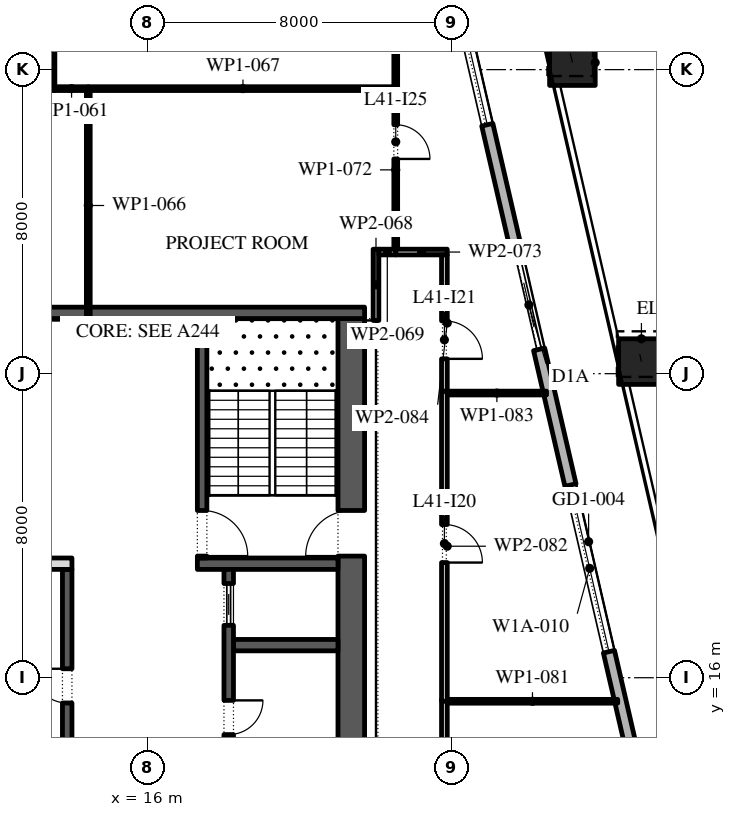
"""IFC4 building model, lengths in metres.
Left out: names, types, materials, properties, quantities, classifications, styles, units other than length and angle.
Written with IfcOpenShell. Run it as: python <this file> out.ifc"""

import sys

from ifc_helpers import new_model, si_unit, direction, frame, frame_2d, origin, origin_2d, place, context, subcontext, project, spatial, rectangle, extrude, element, fill, save


model = new_model("IFC4")
c1 = context("Model", 3, precision=1e-05, world=origin(), true_north=direction((0.0, 1.0)))
c2 = subcontext(c1, "Body", "Model", "MODEL_VIEW")
j1 = project(units=[si_unit("LENGTHUNIT", "METRE"), si_unit("PLANEANGLEUNIT", "RADIAN")], contexts=[c1])
p1 = place(None, origin())
s1 = spatial("IfcSite", under=j1, at=p1, CompositionType="ELEMENT")
p2 = place(p1, origin())
s2 = spatial("IfcBuilding", under=s1, at=p2, CompositionType="ELEMENT")
p3 = place(p2, frame((0.0, 0.0, 188.4)))
s3 = spatial("IfcBuildingStorey", under=s2, at=p3, CompositionType="ELEMENT", Elevation=188.4)
p4 = place(p3, frame((28.984, 24.318, 0.0), z_axis=(-0.010740940982, 0.046737608058, 0.99884945221), x_axis=(-0.974594841169, -0.223975211946, 0.0)))
e1 = element("IfcColumn", 1, at=p4, inside=s3, PredefinedType="COLUMN", context=c2, shape_type="SweptSolid", body=[
    extrude(rectangle(XDim=1.2, YDim=1.2, at=origin_2d()), origin(), (0.0, 0.0, 1.0), 4.205),
])
p5 = place(p3, frame((27.168, 32.185, 0.0), z_axis=(-0.013461020192, 0.058369768591, 0.998204273208), x_axis=(-0.974423835271, -0.224718021653, 0.0)))
e2 = element("IfcColumn", 2, at=p5, inside=s3, PredefinedType="COLUMN", context=c2, shape_type="SweptSolid", body=[
    extrude(rectangle(XDim=1.2, YDim=1.2, at=origin_2d()), origin(), (0.0, 0.0, 1.0), 4.208),
])
p6 = place(p3, frame((33.157, -5.092, 0.0), z_axis=(0.0, 0.0, 1.0), x_axis=(-0.224950279389, 0.974370243697, 0.0)))
e3 = element("IfcWall", 3, at=p6, inside=s3, PredefinedType="STANDARD", context=c2, shape_type="SweptSolid", body=[
    extrude(rectangle(XDim=49.5, YDim=0.3, at=frame_2d((24.75, 0.0))), origin(), (0.0, 0.0, 1.0), 4.0),
])
p7 = place(p6, frame((2.207, 0.0, 0.0)))
e4 = element("IfcOpeningElement", 4, at=p7, cuts=e3, PredefinedType="OPENING", context=c2, shape_type="SweptSolid", body=[
    extrude(rectangle(XDim=2.4, YDim=3.125, at=frame_2d((1.2, 1.562))), frame((0.0, 0.16, 0.0), z_axis=(0.0, -1.0, 0.0), x_axis=(1.0, 0.0, 0.0)), (0.0, 0.0, 1.0), 0.32),
])
p8 = place(p6, frame((8.121, 0.0, 0.45)))
e5 = element("IfcOpeningElement", 5, at=p8, cuts=e3, PredefinedType="OPENING", context=c2, shape_type="SweptSolid", body=[
    extrude(rectangle(XDim=4.5, YDim=2.875, at=frame_2d((2.25, 1.438))), frame((0.0, 0.16, 0.0), z_axis=(0.0, -1.0, 0.0), x_axis=(1.0, 0.0, 0.0)), (0.0, 0.0, 1.0), 0.32),
])
p9 = place(p6, frame((15.236, 0.0, 0.45)))
e6 = element("IfcOpeningElement", 6, at=p9, cuts=e3, PredefinedType="OPENING", context=c2, shape_type="SweptSolid", body=[
    extrude(rectangle(XDim=4.5, YDim=2.875, at=frame_2d((2.25, 1.438))), frame((0.0, 0.16, 0.0), z_axis=(0.0, -1.0, 0.0), x_axis=(1.0, 0.0, 0.0)), (0.0, 0.0, 1.0), 0.32),
])
p10 = place(p6, frame((22.35, 0.0, 0.45)))
e7 = element("IfcOpeningElement", 7, at=p10, cuts=e3, PredefinedType="OPENING", context=c2, shape_type="SweptSolid", body=[
    extrude(rectangle(XDim=4.5, YDim=3.0, at=frame_2d((2.25, 1.5))), frame((0.0, 0.16, 0.0), z_axis=(0.0, -1.0, 0.0), x_axis=(1.0, 0.0, 0.0)), (0.0, 0.0, 1.0), 0.32),
])
p11 = place(p6, frame((30.514, 0.0, 0.0)))
e8 = element("IfcOpeningElement", 8, at=p11, cuts=e3, PredefinedType="OPENING", context=c2, shape_type="SweptSolid", body=[
    extrude(rectangle(XDim=2.4, YDim=3.45, at=frame_2d((1.2, 1.725))), frame((0.0, 0.16, 0.0), z_axis=(0.0, -1.0, 0.0), x_axis=(1.0, 0.0, 0.0)), (0.0, 0.0, 1.0), 0.32),
])
p12 = place(p6, frame((36.579, 0.0, 0.45)))
e9 = element("IfcOpeningElement", 9, at=p12, cuts=e3, PredefinedType="OPENING", context=c2, shape_type="SweptSolid", body=[
    extrude(rectangle(XDim=4.5, YDim=3.05, at=frame_2d((2.25, 1.525))), frame((0.0, 0.16, 0.0), z_axis=(0.0, -1.0, 0.0), x_axis=(1.0, 0.0, 0.0)), (0.0, 0.0, 1.0), 0.32),
])
p13 = place(p6, frame((43.693, 0.0, 0.45)))
e10 = element("IfcOpeningElement", 10, at=p13, cuts=e3, PredefinedType="OPENING", context=c2, shape_type="SweptSolid", body=[
    extrude(rectangle(XDim=4.5, YDim=3.05, at=frame_2d((2.25, 1.525))), frame((0.0, 0.16, 0.0), z_axis=(0.0, -1.0, 0.0), x_axis=(1.0, 0.0, 0.0)), (0.0, 0.0, 1.0), 0.32),
])
p14 = place(p3, frame((21.35, -2.45, 0.0), z_axis=(0.0, 0.0, 1.0), x_axis=(0.0, 1.0, 0.0)))
e11 = element("IfcWall", 11, at=p14, inside=s3, PredefinedType="SHEAR", context=c2, shape_type="SweptSolid", body=[
    extrude(rectangle(XDim=27.9, YDim=0.7, at=frame_2d((13.95, 0.0))), origin(), (0.0, 0.0, 1.0), 4.0),
])
p15 = place(p14, frame((5.05, 0.0, 0.0)))
e12 = element("IfcOpeningElement", 12, at=p15, cuts=e11, PredefinedType="OPENING", context=c2, shape_type="SweptSolid", body=[
    extrude(rectangle(XDim=1.2, YDim=2.1, at=frame_2d((0.6, 1.05))), frame((0.0, 0.36, 0.0), z_axis=(0.0, -1.0, 0.0), x_axis=(1.0, 0.0, 0.0)), (0.0, 0.0, 1.0), 0.72),
])
p16 = place(p14, frame((21.65, 0.0, 0.0)))
e13 = element("IfcOpeningElement", 13, at=p16, cuts=e11, PredefinedType="OPENING", context=c2, shape_type="SweptSolid", body=[
    extrude(rectangle(XDim=1.2, YDim=2.1, at=frame_2d((0.6, 1.05))), frame((0.0, 0.36, 0.0), z_axis=(0.0, -1.0, 0.0), x_axis=(1.0, 0.0, 0.0)), (0.0, 0.0, 1.0), 0.72),
])
p17 = place(p3, frame((10.3, 25.6, 0.0), z_axis=(0.0, 0.0, 1.0), x_axis=(1.0, 0.0, 0.0)))
e14 = element("IfcWall", 14, at=p17, inside=s3, PredefinedType="SHEAR", context=c2, shape_type="SweptSolid", body=[
    extrude(rectangle(XDim=11.4, YDim=0.3, at=frame_2d((5.7, 0.0))), origin(), (0.0, 0.0, 1.0), 4.0),
])
p18 = place(p3, frame((17.3, 19.0, 0.0), z_axis=(0.0, 0.0, 1.0), x_axis=(1.0, 0.0, 0.0)))
e15 = element("IfcWall", 15, at=p18, inside=s3, PredefinedType="SHEAR", context=c2, shape_type="SweptSolid", body=[
    extrude(rectangle(XDim=3.7, YDim=0.3, at=frame_2d((1.85, 0.0))), origin(), (0.0, 0.0, 1.0), 4.0),
])
p19 = place(p3, frame((17.425, 19.15, 0.0), z_axis=(0.0, 0.0, 1.0), x_axis=(0.0, 1.0, 0.0)))
e16 = element("IfcWall", 16, at=p19, inside=s3, PredefinedType="SHEAR", context=c2, shape_type="SweptSolid", body=[
    extrude(rectangle(XDim=6.3, YDim=0.25, at=frame_2d((3.15, 0.0))), origin(), (0.0, 0.0, 1.0), 4.0),
])
p20 = place(p19, frame((0.05, 0.0, 0.0)))
e17 = element("IfcOpeningElement", 17, at=p20, cuts=e16, PredefinedType="OPENING", context=c2, shape_type="SweptSolid", body=[
    extrude(rectangle(XDim=1.2, YDim=2.1, at=frame_2d((0.6, 1.05))), frame((0.0, 0.135, 0.0), z_axis=(0.0, -1.0, 0.0), x_axis=(1.0, 0.0, 0.0)), (0.0, 0.0, 1.0), 0.27),
])
p21 = place(p3, frame((18.25, 16.857, 0.0), z_axis=(0.0, 0.0, 1.0), x_axis=(1.0, 0.0, 0.0)))
e18 = element("IfcWall", 18, at=p21, inside=s3, PredefinedType="SHEAR", context=c2, shape_type="SweptSolid", body=[
    extrude(rectangle(XDim=2.75, YDim=0.3, at=frame_2d((1.375, 0.0))), origin(), (0.0, 0.0, 1.0), 4.0),
])
p22 = place(p3, frame((18.125, 4.15, 0.0), z_axis=(0.0, 0.0, 1.0), x_axis=(0.0, 1.0, 0.0)))
e19 = element("IfcWall", 19, at=p22, inside=s3, PredefinedType="SHEAR", context=c2, shape_type="SweptSolid", body=[
    extrude(rectangle(XDim=14.7, YDim=0.25, at=frame_2d((7.35, 0.0))), origin(), (0.0, 0.0, 1.0), 4.0),
])
p23 = place(p22, frame((3.446, 0.0, 0.0)))
e20 = element("IfcOpeningElement", 20, at=p23, cuts=e19, PredefinedType="OPENING", context=c2, shape_type="SweptSolid", body=[
    extrude(rectangle(XDim=0.9, YDim=2.1, at=frame_2d((0.45, 1.05))), frame((0.0, 0.135, 0.0), z_axis=(0.0, -1.0, 0.0), x_axis=(1.0, 0.0, 0.0)), (0.0, 0.0, 1.0), 0.27),
])
p24 = place(p22, frame((6.9, 0.0, 0.0)))
e21 = element("IfcOpeningElement", 21, at=p24, cuts=e19, PredefinedType="OPENING", context=c2, shape_type="SweptSolid", body=[
    extrude(rectangle(XDim=0.9, YDim=2.1, at=frame_2d((0.45, 1.05))), frame((0.0, 0.135, 0.0), z_axis=(0.0, -1.0, 0.0), x_axis=(1.0, 0.0, 0.0)), (0.0, 0.0, 1.0), 0.27),
])
p25 = place(p22, frame((10.354, 0.0, 0.0)))
e22 = element("IfcOpeningElement", 22, at=p25, cuts=e19, PredefinedType="OPENING", context=c2, shape_type="SweptSolid", body=[
    extrude(rectangle(XDim=0.9, YDim=2.1, at=frame_2d((0.45, 1.05))), frame((0.0, 0.135, 0.0), z_axis=(0.0, -1.0, 0.0), x_axis=(1.0, 0.0, 0.0)), (0.0, 0.0, 1.0), 0.27),
])
p26 = place(p22, frame((0.371, 0.0, 0.0)))
e23 = element("IfcOpeningElement", 23, at=p26, cuts=e19, PredefinedType="OPENING", context=c2, shape_type="SweptSolid", body=[
    extrude(rectangle(XDim=1.1, YDim=2.1, at=frame_2d((0.55, 1.05))), frame((0.0, 0.135, 0.0), z_axis=(0.0, -1.0, 0.0), x_axis=(1.0, 0.0, 0.0)), (0.0, 0.0, 1.0), 0.27),
])
p27 = place(p22, frame((13.229, 0.0, 0.0)))
e24 = element("IfcOpeningElement", 24, at=p27, cuts=e19, PredefinedType="OPENING", context=c2, shape_type="SweptSolid", body=[
    extrude(rectangle(XDim=1.1, YDim=2.1, at=frame_2d((0.55, 1.05))), frame((0.0, 0.135, 0.0), z_axis=(0.0, -1.0, 0.0), x_axis=(1.0, 0.0, 0.0)), (0.0, 0.0, 1.0), 0.27),
])
p28 = place(p3, frame((13.875, -2.45, 0.0), z_axis=(0.0, 0.0, 1.0), x_axis=(0.0, 1.0, 0.0)))
e25 = element("IfcWall", 25, at=p28, inside=s3, PredefinedType="SHEAR", context=c2, shape_type="SweptSolid", body=[
    extrude(rectangle(XDim=21.3, YDim=0.25, at=frame_2d((10.65, 0.0))), origin(), (0.0, 0.0, 1.0), 4.0),
])
p29 = place(p28, frame((17.786, 0.0, 0.0)))
e26 = element("IfcOpeningElement", 26, at=p29, cuts=e25, PredefinedType="OPENING", context=c2, shape_type="SweptSolid", body=[
    extrude(rectangle(XDim=0.9, YDim=2.1, at=frame_2d((0.45, 1.05))), frame((0.0, 0.135, 0.0), z_axis=(0.0, -1.0, 0.0), x_axis=(1.0, 0.0, 0.0)), (0.0, 0.0, 1.0), 0.27),
])
p30 = place(p28, frame((6.971, 0.0, 0.0)))
e27 = element("IfcOpeningElement", 27, at=p30, cuts=e25, PredefinedType="OPENING", context=c2, shape_type="SweptSolid", body=[
    extrude(rectangle(XDim=1.1, YDim=2.1, at=frame_2d((0.55, 1.05))), frame((0.0, 0.135, 0.0), z_axis=(0.0, -1.0, 0.0), x_axis=(1.0, 0.0, 0.0)), (0.0, 0.0, 1.0), 0.27),
])
p31 = place(p28, frame((9.114, 0.0, 0.0)))
e28 = element("IfcOpeningElement", 28, at=p31, cuts=e25, PredefinedType="OPENING", context=c2, shape_type="SweptSolid", body=[
    extrude(rectangle(XDim=1.1, YDim=2.1, at=frame_2d((0.55, 1.05))), frame((0.0, 0.135, 0.0), z_axis=(0.0, -1.0, 0.0), x_axis=(1.0, 0.0, 0.0)), (0.0, 0.0, 1.0), 0.27),
])
p32 = place(p28, frame((11.257, 0.0, 0.0)))
e29 = element("IfcOpeningElement", 29, at=p32, cuts=e25, PredefinedType="OPENING", context=c2, shape_type="SweptSolid", body=[
    extrude(rectangle(XDim=1.1, YDim=2.1, at=frame_2d((0.55, 1.05))), frame((0.0, 0.135, 0.0), z_axis=(0.0, -1.0, 0.0), x_axis=(1.0, 0.0, 0.0)), (0.0, 0.0, 1.0), 0.27),
])
p33 = place(p28, frame((13.4, 0.0, 0.0)))
e30 = element("IfcOpeningElement", 30, at=p33, cuts=e25, PredefinedType="OPENING", context=c2, shape_type="SweptSolid", body=[
    extrude(rectangle(XDim=1.1, YDim=2.1, at=frame_2d((0.55, 1.05))), frame((0.0, 0.135, 0.0), z_axis=(0.0, -1.0, 0.0), x_axis=(1.0, 0.0, 0.0)), (0.0, 0.0, 1.0), 0.27),
])
p34 = place(p3, frame((11.0, 19.0, 0.0), z_axis=(0.0, 0.0, 1.0), x_axis=(1.0, 0.0, 0.0)))
e31 = element("IfcWall", 31, at=p34, inside=s3, PredefinedType="PARTITIONING", context=c2, shape_type="SweptSolid", body=[
    extrude(rectangle(XDim=3.0, YDim=0.3, at=frame_2d((1.5, 0.0))), origin(), (0.0, 0.0, 1.0), 4.0),
])
p35 = place(p3, frame((9.78, 31.5, 0.0), z_axis=(0.0, 0.0, 1.0), x_axis=(1.0, 0.0, 0.0)))
e32 = element("IfcWall", 32, at=p35, inside=s3, PredefinedType="PARTITIONING", context=c2, shape_type="SweptSolid", body=[
    extrude(rectangle(XDim=3.77, YDim=0.1, at=frame_2d((1.885, 0.0))), origin(), (0.0, 0.0, 1.0), 4.0),
])
p36 = place(p3, frame((13.55, 31.5, 0.0), z_axis=(0.0, 0.0, 1.0), x_axis=(1.0, 0.0, 0.0)))
e33 = element("IfcWall", 33, at=p36, inside=s3, PredefinedType="PARTITIONING", context=c2, shape_type="SweptSolid", body=[
    extrude(rectangle(XDim=0.88, YDim=0.1, at=frame_2d((0.44, 0.0))), origin(), (0.0, 0.0, 1.0), 4.0),
])
p37 = place(p3, frame((13.5, 39.95, 0.0), z_axis=(0.0, 0.0, 1.0), x_axis=(0.0, -1.0, 0.0)))
e34 = element("IfcWall", 34, at=p37, inside=s3, PredefinedType="PARTITIONING", context=c2, shape_type="SweptSolid", body=[
    extrude(rectangle(XDim=8.4, YDim=0.1, at=frame_2d((4.2, 0.0))), origin(), (0.0, 0.0, 1.0), 4.0),
])
p38 = place(p3, frame((14.43, 31.45, 0.0), z_axis=(0.0, 0.0, 1.0), x_axis=(0.0, -1.0, 0.0)))
e35 = element("IfcWall", 35, at=p38, inside=s3, PredefinedType="PARTITIONING", context=c2, shape_type="SweptSolid", body=[
    extrude(rectangle(XDim=6.05, YDim=0.1, at=frame_2d((3.025, 0.0))), origin(), (0.0, 0.0, 1.0), 4.0),
])
p39 = place(p3, frame((14.43, 31.5, 0.0), z_axis=(0.0, 0.0, 1.0), x_axis=(1.0, 0.0, 0.0)))
e36 = element("IfcWall", 36, at=p39, inside=s3, PredefinedType="PARTITIONING", context=c2, shape_type="SweptSolid", body=[
    extrude(rectangle(XDim=8.14, YDim=0.1, at=frame_2d((4.07, 0.0))), origin(), (0.0, 0.0, 1.0), 4.0),
])
p40 = place(p3, frame((22.0, 25.4, 0.0), z_axis=(0.0, 0.0, 1.0), x_axis=(0.0, 1.0, 0.0)))
e37 = element("IfcWall", 37, at=p40, inside=s3, PredefinedType="PARTITIONING", context=c2, shape_type="SweptSolid", body=[
    extrude(rectangle(XDim=1.875, YDim=0.15, at=frame_2d((0.938, 0.0))), origin(), (0.0, 0.0, 1.0), 4.0),
])
p41 = place(p3, frame((22.075, 27.2, 0.0), z_axis=(0.0, 0.0, 1.0), x_axis=(1.0, 0.0, 0.0)))
e38 = element("IfcWall", 38, at=p41, inside=s3, PredefinedType="PARTITIONING", context=c2, shape_type="SweptSolid", body=[
    extrude(rectangle(XDim=0.445, YDim=0.15, at=frame_2d((0.223, 0.0))), origin(), (0.0, 0.0, 1.0), 4.0),
])
p42 = place(p3, frame((22.52, 27.275, 0.0), z_axis=(0.0, 0.0, 1.0), x_axis=(0.0, 1.0, 0.0)))
e39 = element("IfcWall", 39, at=p42, inside=s3, PredefinedType="PARTITIONING", context=c2, shape_type="SweptSolid", body=[
    extrude(rectangle(XDim=4.175, YDim=0.1, at=frame_2d((2.087, 0.0))), origin(), (0.0, 0.0, 1.0), 4.0),
])
p43 = place(p42, frame((2.375, 0.0, 0.0)))
e40 = element("IfcOpeningElement", 40, at=p43, cuts=e39, PredefinedType="OPENING", context=c2, shape_type="SweptSolid", body=[
    extrude(rectangle(XDim=0.9, YDim=2.1, at=frame_2d((0.45, 1.05))), frame((0.0, 0.06, 0.0), z_axis=(0.0, -1.0, 0.0), x_axis=(1.0, 0.0, 0.0)), (0.0, 0.0, 1.0), 0.12),
])
p44 = place(p3, frame((22.52, 27.2, 0.0), z_axis=(0.0, 0.0, 1.0), x_axis=(1.0, 0.0, 0.0)))
e41 = element("IfcWall", 41, at=p44, inside=s3, PredefinedType="PARTITIONING", context=c2, shape_type="SweptSolid", body=[
    extrude(rectangle(XDim=1.355, YDim=0.15, at=frame_2d((0.677, 0.0))), origin(), (0.0, 0.0, 1.0), 4.0),
])
p45 = place(p3, frame((22.52, 31.55, 0.0), z_axis=(0.0, 0.0, 1.0), x_axis=(0.0, 1.0, 0.0)))
e42 = element("IfcWall", 42, at=p45, inside=s3, PredefinedType="PARTITIONING", context=c2, shape_type="SweptSolid", body=[
    extrude(rectangle(XDim=5.55, YDim=0.1, at=frame_2d((2.775, 0.0))), origin(), (0.0, 0.0, 1.0), 4.0),
])
p46 = place(p3, frame((23.8, 15.43, 0.0), z_axis=(0.0, 0.0, 1.0), x_axis=(0.0, -1.0, 0.0)))
e43 = element("IfcWall", 43, at=p46, inside=s3, PredefinedType="PARTITIONING", context=c2, shape_type="SweptSolid", body=[
    extrude(rectangle(XDim=13.92, YDim=0.15, at=frame_2d((6.96, 0.0))), origin(), (0.0, 0.0, 1.0), 4.0),
])
p47 = place(p46, frame((9.27, 0.0, 0.0)))
e44 = element("IfcOpeningElement", 44, at=p47, cuts=e43, PredefinedType="OPENING", context=c2, shape_type="SweptSolid", body=[
    extrude(rectangle(XDim=1.0, YDim=2.1, at=frame_2d((0.5, 1.05))), frame((0.0, 0.085, 0.0), z_axis=(0.0, -1.0, 0.0), x_axis=(1.0, 0.0, 0.0)), (0.0, 0.0, 1.0), 0.17),
])
p48 = place(p3, frame((23.875, 15.38, 0.0), z_axis=(0.0, 0.0, 1.0), x_axis=(1.0, 0.0, 0.0)))
e45 = element("IfcWall", 45, at=p48, inside=s3, PredefinedType="PARTITIONING", context=c2, shape_type="SweptSolid", body=[
    extrude(rectangle(XDim=4.485, YDim=0.1, at=frame_2d((2.243, 0.0))), origin(), (0.0, 0.0, 1.0), 4.0),
])
p49 = place(p3, frame((23.8, 23.54, 0.0), z_axis=(0.0, 0.0, 1.0), x_axis=(0.0, -1.0, 0.0)))
e46 = element("IfcWall", 46, at=p49, inside=s3, PredefinedType="PARTITIONING", context=c2, shape_type="SweptSolid", body=[
    extrude(rectangle(XDim=8.16, YDim=0.15, at=frame_2d((4.08, 0.0))), origin(), (0.0, 0.0, 1.0), 4.0),
])
p50 = place(p49, frame((3.51, 0.0, 0.0)))
e47 = element("IfcOpeningElement", 47, at=p50, cuts=e46, PredefinedType="OPENING", context=c2, shape_type="SweptSolid", body=[
    extrude(rectangle(XDim=1.0, YDim=2.1, at=frame_2d((0.5, 1.05))), frame((0.0, 0.085, 0.0), z_axis=(0.0, -1.0, 0.0), x_axis=(1.0, 0.0, 0.0)), (0.0, 0.0, 1.0), 0.17),
])
p51 = place(p3, frame((23.875, 23.49, 0.0), z_axis=(0.0, 0.0, 1.0), x_axis=(1.0, 0.0, 0.0)))
e48 = element("IfcWall", 48, at=p51, inside=s3, PredefinedType="PARTITIONING", context=c2, shape_type="SweptSolid", body=[
    extrude(rectangle(XDim=2.612, YDim=0.1, at=frame_2d((1.306, 0.0))), origin(), (0.0, 0.0, 1.0), 4.0),
])
p52 = place(p3, frame((23.8, 27.125, 0.0), z_axis=(0.0, 0.0, 1.0), x_axis=(0.0, -1.0, 0.0)))
e49 = element("IfcWall", 49, at=p52, inside=s3, PredefinedType="PARTITIONING", context=c2, shape_type="SweptSolid", body=[
    extrude(rectangle(XDim=3.585, YDim=0.15, at=frame_2d((1.792, 0.0))), origin(), (0.0, 0.0, 1.0), 4.0),
])
p53 = place(p52, frame((1.735, 0.0, 0.0)))
e50 = element("IfcOpeningElement", 50, at=p53, cuts=e49, PredefinedType="OPENING", context=c2, shape_type="SweptSolid", body=[
    extrude(rectangle(XDim=1.0, YDim=2.1, at=frame_2d((0.5, 1.05))), frame((0.0, 0.085, 0.0), z_axis=(0.0, -1.0, 0.0), x_axis=(1.0, 0.0, 0.0)), (0.0, 0.0, 1.0), 0.17),
])
p54 = place(p10, origin())
e51 = element("IfcWindow", 51, at=p54, inside=s3, PartitioningType="DOUBLE_PANEL_VERTICAL", PredefinedType="WINDOW", context=c2, shape_type="SweptSolid", body=[
    extrude(rectangle(XDim=4.5, YDim=3.0, at=frame_2d((2.25, 1.5))), frame((0.0, 0.03, 0.0), z_axis=(0.0, -1.0, 0.0), x_axis=(1.0, 0.0, 0.0)), (0.0, 0.0, 1.0), 0.06),
])
fill(e7, e51)
p55 = place(p11, origin())
e52 = element("IfcDoor", 52, at=p55, inside=s3, OperationType="DOUBLE_DOOR_SLIDING", PredefinedType="DOOR", context=c2, shape_type="SweptSolid", body=[
    extrude(rectangle(XDim=2.4, YDim=3.45, at=frame_2d((1.2, 1.725))), frame((0.0, 0.025, 0.0), z_axis=(0.0, -1.0, 0.0), x_axis=(1.0, 0.0, 0.0)), (0.0, 0.0, 1.0), 0.05),
])
fill(e8, e52)
p56 = place(p12, origin())
e53 = element("IfcWindow", 53, at=p56, inside=s3, PartitioningType="DOUBLE_PANEL_VERTICAL", PredefinedType="WINDOW", context=c2, shape_type="SweptSolid", body=[
    extrude(rectangle(XDim=4.5, YDim=3.05, at=frame_2d((2.25, 1.525))), frame((0.0, 0.03, 0.0), z_axis=(0.0, -1.0, 0.0), x_axis=(1.0, 0.0, 0.0)), (0.0, 0.0, 1.0), 0.06),
])
fill(e9, e53)
p57 = place(p25, frame((0.9, -0.2, 0.0), z_axis=(0.0, 0.0, 1.0), x_axis=(-1.0, 0.0, 0.0)))
e54 = element("IfcDoor", 54, at=p57, inside=s3, OperationType="SINGLE_SWING_RIGHT", PredefinedType="DOOR", context=c2, shape_type="SweptSolid", body=[
    extrude(rectangle(XDim=0.9, YDim=2.1, at=frame_2d((0.45, 1.05))), frame((0.0, -0.075, 0.0), z_axis=(0.0, -1.0, 0.0), x_axis=(1.0, 0.0, 0.0)), (0.0, 0.0, 1.0), 0.05),
])
fill(e22, e54)
p58 = place(p27, origin())
e55 = element("IfcDoor", 55, at=p58, inside=s3, OperationType="SLIDING_TO_LEFT", PredefinedType="DOOR", context=c2, shape_type="SweptSolid", body=[
    extrude(rectangle(XDim=1.1, YDim=2.1, at=frame_2d((0.55, 1.05))), frame((0.0, 0.025, 0.0), z_axis=(0.0, -1.0, 0.0), x_axis=(1.0, 0.0, 0.0)), (0.0, 0.0, 1.0), 0.05),
])
fill(e24, e55)
p59 = place(p29, origin())
e56 = element("IfcDoor", 56, at=p59, inside=s3, OperationType="SINGLE_SWING_LEFT", PredefinedType="DOOR", context=c2, shape_type="SweptSolid", body=[
    extrude(rectangle(XDim=0.9, YDim=2.1, at=frame_2d((0.45, 1.05))), frame((0.0, 0.125, 0.0), z_axis=(0.0, -1.0, 0.0), x_axis=(1.0, 0.0, 0.0)), (0.0, 0.0, 1.0), 0.05),
])
fill(e26, e56)
p60 = place(p20, frame((1.2, 0.0, 0.0), z_axis=(0.0, 0.0, 1.0), x_axis=(-1.0, 0.0, 0.0)))
e57 = element("IfcDoor", 57, at=p60, inside=s3, OperationType="SINGLE_SWING_LEFT", PredefinedType="DOOR", context=c2, shape_type="SweptSolid", body=[
    extrude(rectangle(XDim=1.2, YDim=2.1, at=frame_2d((0.6, 1.05))), frame((0.0, 0.025, 0.0), z_axis=(0.0, -1.0, 0.0), x_axis=(1.0, 0.0, 0.0)), (0.0, 0.0, 1.0), 0.05),
])
fill(e17, e57)
p61 = place(p16, origin())
e58 = element("IfcDoor", 58, at=p61, inside=s3, OperationType="SINGLE_SWING_RIGHT", PredefinedType="DOOR", context=c2, shape_type="SweptSolid", body=[
    extrude(rectangle(XDim=1.2, YDim=2.1, at=frame_2d((0.6, 1.05))), frame((0.0, 0.025, 0.0), z_axis=(0.0, -1.0, 0.0), x_axis=(1.0, 0.0, 0.0)), (0.0, 0.0, 1.0), 0.05),
])
fill(e13, e58)
p62 = place(p50, origin())
e59 = element("IfcDoor", 59, at=p62, inside=s3, OperationType="SINGLE_SWING_LEFT", PredefinedType="DOOR", context=c2, shape_type="SweptSolid", body=[
    extrude(rectangle(XDim=1.0, YDim=2.1, at=frame_2d((0.5, 1.05))), frame((0.0, 0.025, 0.0), z_axis=(0.0, -1.0, 0.0), x_axis=(1.0, 0.0, 0.0)), (0.0, 0.0, 1.0), 0.05),
])
fill(e47, e59)
p63 = place(p53, origin())
e60 = element("IfcDoor", 60, at=p63, inside=s3, OperationType="SINGLE_SWING_LEFT", PredefinedType="DOOR", context=c2, shape_type="SweptSolid", body=[
    extrude(rectangle(XDim=1.0, YDim=2.1, at=frame_2d((0.5, 1.05))), frame((0.0, 0.025, 0.0), z_axis=(0.0, -1.0, 0.0), x_axis=(1.0, 0.0, 0.0)), (0.0, 0.0, 1.0), 0.05),
])
fill(e50, e60)
p64 = place(p43, frame((0.9, 0.0, 0.0), z_axis=(0.0, 0.0, 1.0), x_axis=(-1.0, 0.0, 0.0)))
e61 = element("IfcDoor", 61, at=p64, inside=s3, OperationType="SINGLE_SWING_LEFT", PredefinedType="DOOR", context=c2, shape_type="SweptSolid", body=[
    extrude(rectangle(XDim=0.9, YDim=2.1, at=frame_2d((0.45, 1.05))), frame((0.0, 0.025, 0.0), z_axis=(0.0, -1.0, 0.0), x_axis=(1.0, 0.0, 0.0)), (0.0, 0.0, 1.0), 0.05),
])
fill(e40, e61)
save(model, sys.argv[1])
